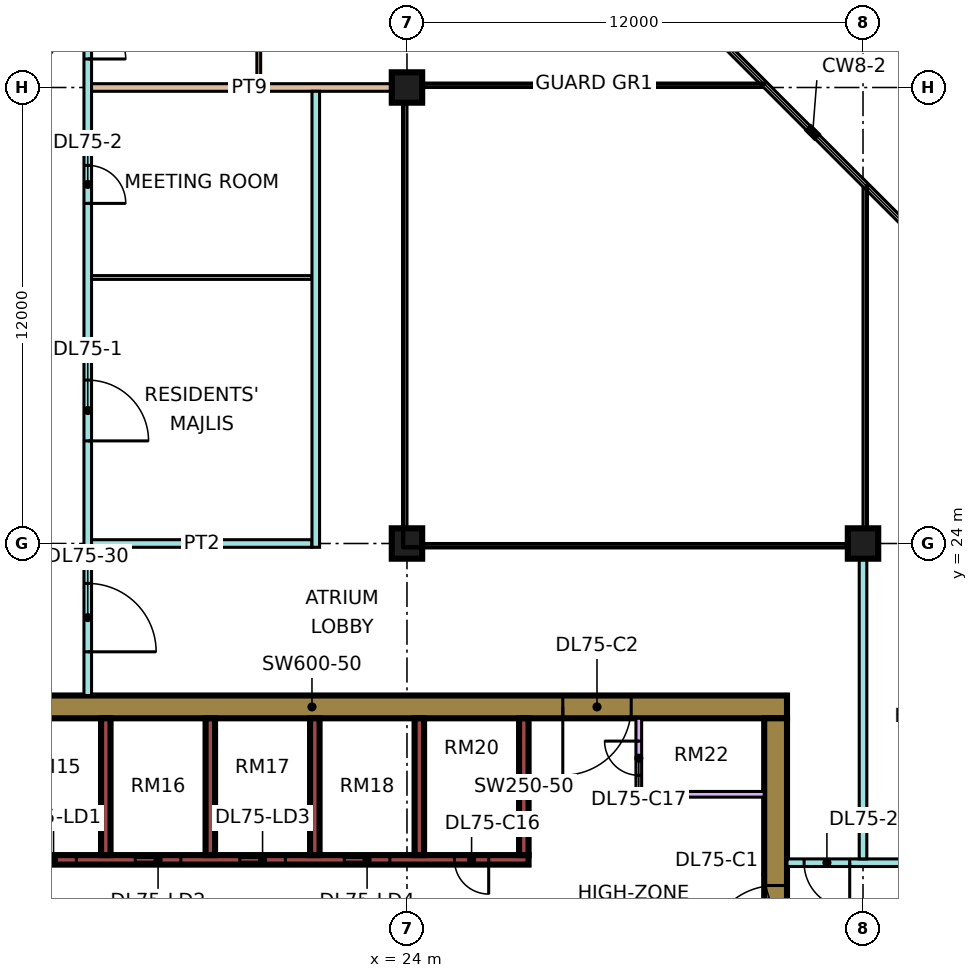
"""IFC4 building model, lengths in metres.
Left out: names, types, materials, properties, quantities, classifications, styles, units other than length and angle.
Written with IfcOpenShell. Run it as: python <this file> out.ifc"""

import sys

from ifc_helpers import new_model, si_unit, direction, frame, frame_2d, origin, origin_2d, place, context, subcontext, project, spatial, rectangle, extrude, element, fill, save


model = new_model("IFC4")
c1 = context("Model", 3, precision=1e-05, world=origin(), true_north=direction((0.0, 1.0)))
c2 = subcontext(c1, "Body", "Model", "MODEL_VIEW")
j1 = project(units=[si_unit("LENGTHUNIT", "METRE"), si_unit("PLANEANGLEUNIT", "RADIAN")], contexts=[c1])
p1 = place(None, origin())
s1 = spatial("IfcSite", under=j1, at=p1, CompositionType="ELEMENT")
p2 = place(p1, origin())
s2 = spatial("IfcBuilding", under=s1, at=p2, CompositionType="ELEMENT")
p3 = place(p2, frame((0.0, 0.0, 318.4)))
s3 = spatial("IfcBuildingStorey", under=s2, at=p3, CompositionType="ELEMENT", Elevation=318.4)
for number, where, z_axis, x_axis in (
    (1, (24.0, 24.0, 0.0), (0.0, 0.0, 1.0), (1.0, 0.0, 0.0)),
    (2, (24.0, 36.0, 0.0), (0.0, 0.0, 1.0), (1.0, 0.0, 0.0)),
    (3, (36.0, 24.0, 0.0), (0.0, 0.0, 1.0), (1.0, 0.0, 0.0)),
):
    element("IfcColumn", number, at=place(p3, frame(where, z_axis=z_axis, x_axis=x_axis)), inside=s3, PredefinedType="COLUMN", context=c2, shape_type="SweptSolid", body=[
        extrude(rectangle(XDim=0.8, YDim=0.8, at=origin_2d()), origin(), (0.0, 0.0, 1.0), 3.75),
    ])
p4 = place(p3, frame((9.0, 19.7, 0.0), z_axis=(0.0, 0.0, 1.0), x_axis=(1.0, 0.0, 0.0)))
e4 = element("IfcWall", 4, at=p4, inside=s3, PredefinedType="SHEAR", context=c2, shape_type="SweptSolid", body=[
    extrude(rectangle(XDim=25.0, YDim=0.6, at=frame_2d((12.5, 0.0))), origin(), (0.0, 0.0, 1.0), 3.75),
])
p5 = place(p4, frame((19.1, 0.0, 0.0)))
e5 = element("IfcOpeningElement", 5, at=p5, cuts=e4, PredefinedType="OPENING", context=c2, shape_type="SweptSolid", body=[
    extrude(rectangle(XDim=1.8, YDim=2.4, at=frame_2d((0.9, 1.2))), frame((0.0, 0.31, 0.0), z_axis=(0.0, -1.0, 0.0), x_axis=(1.0, 0.0, 0.0)), (0.0, 0.0, 1.0), 0.62),
])
p6 = place(p3, frame((33.7, 7.6, 0.0), z_axis=(0.0, 0.0, 1.0), x_axis=(0.0, 1.0, 0.0)))
e6 = element("IfcWall", 6, at=p6, inside=s3, PredefinedType="SHEAR", context=c2, shape_type="SweptSolid", body=[
    extrude(rectangle(XDim=11.8, YDim=0.6, at=frame_2d((5.9, 0.0))), origin(), (0.0, 0.0, 1.0), 3.75),
])
p7 = place(p6, frame((5.6, 0.0, 0.0)))
e7 = element("IfcOpeningElement", 7, at=p7, cuts=e6, PredefinedType="OPENING", context=c2, shape_type="SweptSolid", body=[
    extrude(rectangle(XDim=1.8, YDim=2.4, at=frame_2d((0.9, 1.2))), frame((0.0, 0.31, 0.0), z_axis=(0.0, -1.0, 0.0), x_axis=(1.0, 0.0, 0.0)), (0.0, 0.0, 1.0), 0.62),
])
p8 = place(p3, frame((13.45, 15.675, 0.0), z_axis=(0.0, 0.0, 1.0), x_axis=(1.0, 0.0, 0.0)))
e8 = element("IfcWall", 8, at=p8, inside=s3, PredefinedType="SHEAR", context=c2, shape_type="SweptSolid", body=[
    extrude(rectangle(XDim=13.75, YDim=0.25, at=frame_2d((6.875, 0.0))), origin(), (0.0, 0.0, 1.0), 3.75),
])
p9 = place(p8, frame((0.65, 0.0, 0.0)))
e9 = element("IfcOpeningElement", 9, at=p9, cuts=e8, PredefinedType="OPENING", context=c2, shape_type="SweptSolid", body=[
    extrude(rectangle(XDim=1.2, YDim=2.2, at=frame_2d((0.6, 1.1))), frame((0.0, 0.135, 0.0), z_axis=(0.0, -1.0, 0.0), x_axis=(1.0, 0.0, 0.0)), (0.0, 0.0, 1.0), 0.27),
])
p10 = place(p8, frame((3.4, 0.0, 0.0)))
e10 = element("IfcOpeningElement", 10, at=p10, cuts=e8, PredefinedType="OPENING", context=c2, shape_type="SweptSolid", body=[
    extrude(rectangle(XDim=1.2, YDim=2.2, at=frame_2d((0.6, 1.1))), frame((0.0, 0.135, 0.0), z_axis=(0.0, -1.0, 0.0), x_axis=(1.0, 0.0, 0.0)), (0.0, 0.0, 1.0), 0.27),
])
p11 = place(p8, frame((6.15, 0.0, 0.0)))
e11 = element("IfcOpeningElement", 11, at=p11, cuts=e8, PredefinedType="OPENING", context=c2, shape_type="SweptSolid", body=[
    extrude(rectangle(XDim=1.2, YDim=2.2, at=frame_2d((0.6, 1.1))), frame((0.0, 0.135, 0.0), z_axis=(0.0, -1.0, 0.0), x_axis=(1.0, 0.0, 0.0)), (0.0, 0.0, 1.0), 0.27),
])
p12 = place(p8, frame((8.9, 0.0, 0.0)))
e12 = element("IfcOpeningElement", 12, at=p12, cuts=e8, PredefinedType="OPENING", context=c2, shape_type="SweptSolid", body=[
    extrude(rectangle(XDim=1.2, YDim=2.2, at=frame_2d((0.6, 1.1))), frame((0.0, 0.135, 0.0), z_axis=(0.0, -1.0, 0.0), x_axis=(1.0, 0.0, 0.0)), (0.0, 0.0, 1.0), 0.27),
])
p13 = place(p8, frame((11.8, 0.0, 0.0)))
e13 = element("IfcOpeningElement", 13, at=p13, cuts=e8, PredefinedType="OPENING", context=c2, shape_type="SweptSolid", body=[
    extrude(rectangle(XDim=0.9, YDim=2.1, at=frame_2d((0.45, 1.05))), frame((0.0, 0.135, 0.0), z_axis=(0.0, -1.0, 0.0), x_axis=(1.0, 0.0, 0.0)), (0.0, 0.0, 1.0), 0.27),
])
for number, where, z_axis, x_axis in (
    (14, (16.075, 15.8, 0.0), (0.0, 0.0, 1.0), (0.0, 1.0, 0.0)),
    (15, (18.825, 15.8, 0.0), (0.0, 0.0, 1.0), (0.0, 1.0, 0.0)),
    (16, (21.575, 15.8, 0.0), (0.0, 0.0, 1.0), (0.0, 1.0, 0.0)),
    (17, (24.325, 15.8, 0.0), (0.0, 0.0, 1.0), (0.0, 1.0, 0.0)),
    (18, (27.075, 15.8, 0.0), (0.0, 0.0, 1.0), (0.0, 1.0, 0.0)),
):
    element("IfcWall", number, at=place(p3, frame(where, z_axis=z_axis, x_axis=x_axis)), inside=s3, PredefinedType="SHEAR", context=c2, shape_type="SweptSolid", body=[
        extrude(rectangle(XDim=3.6, YDim=0.25, at=frame_2d((1.8, 0.0))), origin(), (0.0, 0.0, 1.0), 3.75),
    ])
p14 = place(p3, frame((30.1, 17.4, 0.0), z_axis=(0.0, 0.0, 1.0), x_axis=(0.0, 1.0, 0.0)))
e19 = element("IfcWall", 19, at=p14, inside=s3, PredefinedType="PARTITIONING", context=c2, shape_type="SweptSolid", body=[
    extrude(rectangle(XDim=2.0, YDim=0.15, at=frame_2d((1.0, 0.0))), origin(), (0.0, 0.0, 1.0), 3.3),
])
p15 = place(p14, frame((0.5, 0.0, 0.0)))
e20 = element("IfcOpeningElement", 20, at=p15, cuts=e19, PredefinedType="OPENING", context=c2, shape_type="SweptSolid", body=[
    extrude(rectangle(XDim=0.9, YDim=2.1, at=frame_2d((0.45, 1.05))), frame((0.0, 0.085, 0.0), z_axis=(0.0, -1.0, 0.0), x_axis=(1.0, 0.0, 0.0)), (0.0, 0.0, 1.0), 0.17),
])
p16 = place(p3, frame((30.1, 17.4, 0.0), z_axis=(0.0, 0.0, 1.0), x_axis=(1.0, 0.0, 0.0)))
e21 = element("IfcWall", 21, at=p16, inside=s3, PredefinedType="PARTITIONING", context=c2, shape_type="SweptSolid", body=[
    extrude(rectangle(XDim=3.3, YDim=0.15, at=frame_2d((1.65, 0.0))), origin(), (0.0, 0.0, 1.0), 3.3),
])
p17 = place(p3, frame((15.6, 20.0, 0.0), z_axis=(0.0, 0.0, 1.0), x_axis=(0.0, 1.0, 0.0)))
e22 = element("IfcWall", 22, at=p17, inside=s3, PredefinedType="PARTITIONING", context=c2, shape_type="SweptSolid", body=[
    extrude(rectangle(XDim=27.775, YDim=0.2, at=frame_2d((13.887, 0.0))), origin(), (0.0, 0.0, 1.0), 3.3),
])
p18 = place(p17, frame((6.7, 0.0, 0.0)))
e23 = element("IfcOpeningElement", 23, at=p18, cuts=e22, PredefinedType="OPENING", context=c2, shape_type="SweptSolid", body=[
    extrude(rectangle(XDim=1.6, YDim=2.1, at=frame_2d((0.8, 1.05))), frame((0.0, 0.11, 0.0), z_axis=(0.0, -1.0, 0.0), x_axis=(1.0, 0.0, 0.0)), (0.0, 0.0, 1.0), 0.22),
])
p19 = place(p17, frame((12.95, 0.0, 0.0)))
e24 = element("IfcOpeningElement", 24, at=p19, cuts=e22, PredefinedType="OPENING", context=c2, shape_type="SweptSolid", body=[
    extrude(rectangle(XDim=1.0, YDim=2.1, at=frame_2d((0.5, 1.05))), frame((0.0, 0.11, 0.0), z_axis=(0.0, -1.0, 0.0), x_axis=(1.0, 0.0, 0.0)), (0.0, 0.0, 1.0), 0.22),
])
p20 = place(p17, frame((16.75, 0.0, 0.0)))
e25 = element("IfcOpeningElement", 25, at=p20, cuts=e22, PredefinedType="OPENING", context=c2, shape_type="SweptSolid", body=[
    extrude(rectangle(XDim=1.0, YDim=2.1, at=frame_2d((0.5, 1.05))), frame((0.0, 0.11, 0.0), z_axis=(0.0, -1.0, 0.0), x_axis=(1.0, 0.0, 0.0)), (0.0, 0.0, 1.0), 0.22),
])
p21 = place(p17, frame((1.15, 0.0, 0.0)))
e26 = element("IfcOpeningElement", 26, at=p21, cuts=e22, PredefinedType="OPENING", context=c2, shape_type="SweptSolid", body=[
    extrude(rectangle(XDim=1.8, YDim=2.1, at=frame_2d((0.9, 1.05))), frame((0.0, 0.11, 0.0), z_axis=(0.0, -1.0, 0.0), x_axis=(1.0, 0.0, 0.0)), (0.0, 0.0, 1.0), 0.22),
])
p22 = place(p17, frame((25.9, 0.0, 0.0)))
e27 = element("IfcOpeningElement", 27, at=p22, cuts=e22, PredefinedType="OPENING", context=c2, shape_type="SweptSolid", body=[
    extrude(rectangle(XDim=1.0, YDim=2.1, at=frame_2d((0.5, 1.05))), frame((0.0, 0.11, 0.0), z_axis=(0.0, -1.0, 0.0), x_axis=(1.0, 0.0, 0.0)), (0.0, 0.0, 1.0), 0.22),
])
p23 = place(p3, frame((15.7, 24.0, 0.0), z_axis=(0.0, 0.0, 1.0), x_axis=(1.0, 0.0, 0.0)))
e28 = element("IfcWall", 28, at=p23, inside=s3, PredefinedType="PARTITIONING", context=c2, shape_type="SweptSolid", body=[
    extrude(rectangle(XDim=5.8, YDim=0.2, at=frame_2d((2.9, 0.0))), origin(), (0.0, 0.0, 1.0), 3.3),
])
p24 = place(p3, frame((15.7, 31.0, 0.0), z_axis=(0.0, 0.0, 1.0), x_axis=(1.0, 0.0, 0.0)))
e29 = element("IfcWall", 29, at=p24, inside=s3, PredefinedType="PARTITIONING", context=c2, shape_type="SweptSolid", body=[
    extrude(rectangle(XDim=5.8, YDim=0.1, at=frame_2d((2.9, 0.0))), origin(), (0.0, 0.0, 1.0), 3.3),
])
p25 = place(p3, frame((15.7, 36.0, 0.0), z_axis=(0.0, 0.0, 1.0), x_axis=(1.0, 0.0, 0.0)))
e30 = element("IfcWall", 30, at=p25, inside=s3, PredefinedType="PARTITIONING", context=c2, shape_type="SweptSolid", body=[
    extrude(rectangle(XDim=8.3, YDim=0.2, at=frame_2d((4.15, 0.0))), origin(), (0.0, 0.0, 1.0), 3.3),
])
p26 = place(p3, frame((20.1, 36.1, 0.0), z_axis=(0.0, 0.0, 1.0), x_axis=(0.0, 1.0, 0.0)))
e31 = element("IfcWall", 31, at=p26, inside=s3, PredefinedType="PARTITIONING", context=c2, shape_type="SweptSolid", body=[
    extrude(rectangle(XDim=5.95, YDim=0.1, at=frame_2d((2.975, 0.0))), origin(), (0.0, 0.0, 1.0), 3.3),
])
p27 = place(p26, frame((0.95, 0.0, 0.0)))
e32 = element("IfcOpeningElement", 32, at=p27, cuts=e31, PredefinedType="OPENING", context=c2, shape_type="SweptSolid", body=[
    extrude(rectangle(XDim=0.9, YDim=2.1, at=frame_2d((0.45, 1.05))), frame((0.0, 0.06, 0.0), z_axis=(0.0, -1.0, 0.0), x_axis=(1.0, 0.0, 0.0)), (0.0, 0.0, 1.0), 0.12),
])
p28 = place(p26, frame((3.95, 0.0, 0.0)))
e33 = element("IfcOpeningElement", 33, at=p28, cuts=e31, PredefinedType="OPENING", context=c2, shape_type="SweptSolid", body=[
    extrude(rectangle(XDim=0.9, YDim=2.1, at=frame_2d((0.45, 1.05))), frame((0.0, 0.06, 0.0), z_axis=(0.0, -1.0, 0.0), x_axis=(1.0, 0.0, 0.0)), (0.0, 0.0, 1.0), 0.12),
])
p29 = place(p3, frame((21.6, 23.9, 0.0), z_axis=(0.0, 0.0, 1.0), x_axis=(0.0, 1.0, 0.0)))
e34 = element("IfcWall", 34, at=p29, inside=s3, PredefinedType="PARTITIONING", context=c2, shape_type="SweptSolid", body=[
    extrude(rectangle(XDim=12.0, YDim=0.2, at=frame_2d((6.0, 0.0))), origin(), (0.0, 0.0, 1.0), 3.3),
])
p30 = place(p3, frame((34.0, 15.6, 0.0), z_axis=(0.0, 0.0, 1.0), x_axis=(1.0, 0.0, 0.0)))
e35 = element("IfcWall", 35, at=p30, inside=s3, PredefinedType="PARTITIONING", context=c2, shape_type="SweptSolid", body=[
    extrude(rectangle(XDim=10.35, YDim=0.2, at=frame_2d((5.175, 0.0))), origin(), (0.0, 0.0, 1.0), 3.3),
])
p31 = place(p30, frame((5.6, 0.0, 0.0)))
e36 = element("IfcOpeningElement", 36, at=p31, cuts=e35, PredefinedType="OPENING", context=c2, shape_type="SweptSolid", body=[
    extrude(rectangle(XDim=1.0, YDim=2.1, at=frame_2d((0.5, 1.05))), frame((0.0, 0.11, 0.0), z_axis=(0.0, -1.0, 0.0), x_axis=(1.0, 0.0, 0.0)), (0.0, 0.0, 1.0), 0.22),
])
p32 = place(p30, frame((0.45, 0.0, 0.0)))
e37 = element("IfcOpeningElement", 37, at=p32, cuts=e35, PredefinedType="OPENING", context=c2, shape_type="SweptSolid", body=[
    extrude(rectangle(XDim=1.2, YDim=2.1, at=frame_2d((0.6, 1.05))), frame((0.0, 0.11, 0.0), z_axis=(0.0, -1.0, 0.0), x_axis=(1.0, 0.0, 0.0)), (0.0, 0.0, 1.0), 0.22),
])
p33 = place(p3, frame((36.0, 15.7, 0.0), z_axis=(0.0, 0.0, 1.0), x_axis=(0.0, 1.0, 0.0)))
e38 = element("IfcWall", 38, at=p33, inside=s3, PredefinedType="PARTITIONING", context=c2, shape_type="SweptSolid", body=[
    extrude(rectangle(XDim=8.3, YDim=0.2, at=frame_2d((4.15, 0.0))), origin(), (0.0, 0.0, 1.0), 3.3),
])
p34 = place(p9, origin())
e39 = element("IfcDoor", 39, at=p34, inside=s3, OperationType="DOUBLE_DOOR_SLIDING", PredefinedType="DOOR", context=c2, shape_type="SweptSolid", body=[
    extrude(rectangle(XDim=1.2, YDim=2.2, at=frame_2d((0.6, 1.1))), frame((0.0, 0.025, 0.0), z_axis=(0.0, -1.0, 0.0), x_axis=(1.0, 0.0, 0.0)), (0.0, 0.0, 1.0), 0.05),
])
fill(e9, e39)
p35 = place(p10, origin())
e40 = element("IfcDoor", 40, at=p35, inside=s3, OperationType="DOUBLE_DOOR_SLIDING", PredefinedType="DOOR", context=c2, shape_type="SweptSolid", body=[
    extrude(rectangle(XDim=1.2, YDim=2.2, at=frame_2d((0.6, 1.1))), frame((0.0, 0.025, 0.0), z_axis=(0.0, -1.0, 0.0), x_axis=(1.0, 0.0, 0.0)), (0.0, 0.0, 1.0), 0.05),
])
fill(e10, e40)
p36 = place(p11, origin())
e41 = element("IfcDoor", 41, at=p36, inside=s3, OperationType="DOUBLE_DOOR_SLIDING", PredefinedType="DOOR", context=c2, shape_type="SweptSolid", body=[
    extrude(rectangle(XDim=1.2, YDim=2.2, at=frame_2d((0.6, 1.1))), frame((0.0, 0.025, 0.0), z_axis=(0.0, -1.0, 0.0), x_axis=(1.0, 0.0, 0.0)), (0.0, 0.0, 1.0), 0.05),
])
fill(e11, e41)
p37 = place(p12, origin())
e42 = element("IfcDoor", 42, at=p37, inside=s3, OperationType="DOUBLE_DOOR_SLIDING", PredefinedType="DOOR", context=c2, shape_type="SweptSolid", body=[
    extrude(rectangle(XDim=1.2, YDim=2.2, at=frame_2d((0.6, 1.1))), frame((0.0, 0.025, 0.0), z_axis=(0.0, -1.0, 0.0), x_axis=(1.0, 0.0, 0.0)), (0.0, 0.0, 1.0), 0.05),
])
fill(e12, e42)
p38 = place(p7, origin())
e43 = element("IfcDoor", 43, at=p38, inside=s3, OperationType="DOUBLE_DOOR_SINGLE_SWING", PredefinedType="DOOR", context=c2, shape_type="SweptSolid", body=[
    extrude(rectangle(XDim=1.8, YDim=2.4, at=frame_2d((0.9, 1.2))), frame((0.0, 0.025, 0.0), z_axis=(0.0, -1.0, 0.0), x_axis=(1.0, 0.0, 0.0)), (0.0, 0.0, 1.0), 0.05),
])
fill(e7, e43)
p39 = place(p5, frame((1.8, 0.0, 0.0), z_axis=(0.0, 0.0, 1.0), x_axis=(-1.0, 0.0, 0.0)))
e44 = element("IfcDoor", 44, at=p39, inside=s3, OperationType="DOUBLE_DOOR_SINGLE_SWING", PredefinedType="DOOR", context=c2, shape_type="SweptSolid", body=[
    extrude(rectangle(XDim=1.8, YDim=2.4, at=frame_2d((0.9, 1.2))), frame((0.0, 0.025, 0.0), z_axis=(0.0, -1.0, 0.0), x_axis=(1.0, 0.0, 0.0)), (0.0, 0.0, 1.0), 0.05),
])
fill(e5, e44)
p40 = place(p13, origin())
e45 = element("IfcDoor", 45, at=p40, inside=s3, OperationType="SINGLE_SWING_RIGHT", PredefinedType="DOOR", context=c2, shape_type="SweptSolid", body=[
    extrude(rectangle(XDim=0.9, YDim=2.1, at=frame_2d((0.45, 1.05))), frame((0.0, 0.025, 0.0), z_axis=(0.0, -1.0, 0.0), x_axis=(1.0, 0.0, 0.0)), (0.0, 0.0, 1.0), 0.05),
])
fill(e13, e45)
p41 = place(p15, frame((0.9, 0.0, 0.0), z_axis=(0.0, 0.0, 1.0), x_axis=(-1.0, 0.0, 0.0)))
e46 = element("IfcDoor", 46, at=p41, inside=s3, OperationType="SINGLE_SWING_RIGHT", PredefinedType="DOOR", context=c2, shape_type="SweptSolid", body=[
    extrude(rectangle(XDim=0.9, YDim=2.1, at=frame_2d((0.45, 1.05))), frame((0.0, 0.025, 0.0), z_axis=(0.0, -1.0, 0.0), x_axis=(1.0, 0.0, 0.0)), (0.0, 0.0, 1.0), 0.05),
])
fill(e20, e46)
p42 = place(p18, frame((1.6, 0.0, 0.0), z_axis=(0.0, 0.0, 1.0), x_axis=(-1.0, 0.0, 0.0)))
e47 = element("IfcDoor", 47, at=p42, inside=s3, OperationType="DOUBLE_DOOR_SINGLE_SWING", PredefinedType="DOOR", context=c2, shape_type="SweptSolid", body=[
    extrude(rectangle(XDim=1.6, YDim=2.1, at=frame_2d((0.8, 1.05))), frame((0.0, 0.025, 0.0), z_axis=(0.0, -1.0, 0.0), x_axis=(1.0, 0.0, 0.0)), (0.0, 0.0, 1.0), 0.05),
])
fill(e23, e47)
p43 = place(p19, frame((1.0, 0.0, 0.0), z_axis=(0.0, 0.0, 1.0), x_axis=(-1.0, 0.0, 0.0)))
e48 = element("IfcDoor", 48, at=p43, inside=s3, OperationType="SINGLE_SWING_LEFT", PredefinedType="DOOR", context=c2, shape_type="SweptSolid", body=[
    extrude(rectangle(XDim=1.0, YDim=2.1, at=frame_2d((0.5, 1.05))), frame((0.0, 0.025, 0.0), z_axis=(0.0, -1.0, 0.0), x_axis=(1.0, 0.0, 0.0)), (0.0, 0.0, 1.0), 0.05),
])
fill(e24, e48)
p44 = place(p20, frame((1.0, 0.0, 0.0), z_axis=(0.0, 0.0, 1.0), x_axis=(-1.0, 0.0, 0.0)))
e49 = element("IfcDoor", 49, at=p44, inside=s3, OperationType="SINGLE_SWING_LEFT", PredefinedType="DOOR", context=c2, shape_type="SweptSolid", body=[
    extrude(rectangle(XDim=1.0, YDim=2.1, at=frame_2d((0.5, 1.05))), frame((0.0, 0.025, 0.0), z_axis=(0.0, -1.0, 0.0), x_axis=(1.0, 0.0, 0.0)), (0.0, 0.0, 1.0), 0.05),
])
fill(e25, e49)
p45 = place(p32, origin())
e50 = element("IfcDoor", 50, at=p45, inside=s3, OperationType="SINGLE_SWING_RIGHT", PredefinedType="DOOR", context=c2, shape_type="SweptSolid", body=[
    extrude(rectangle(XDim=1.2, YDim=2.1, at=frame_2d((0.6, 1.05))), frame((0.0, 0.025, 0.0), z_axis=(0.0, -1.0, 0.0), x_axis=(1.0, 0.0, 0.0)), (0.0, 0.0, 1.0), 0.05),
])
fill(e37, e50)
p46 = place(p21, frame((1.8, 0.0, 0.0), z_axis=(0.0, 0.0, 1.0), x_axis=(-1.0, 0.0, 0.0)))
e51 = element("IfcDoor", 51, at=p46, inside=s3, OperationType="DOUBLE_DOOR_SINGLE_SWING", PredefinedType="DOOR", context=c2, shape_type="SweptSolid", body=[
    extrude(rectangle(XDim=1.8, YDim=2.1, at=frame_2d((0.9, 1.05))), frame((0.0, 0.025, 0.0), z_axis=(0.0, -1.0, 0.0), x_axis=(1.0, 0.0, 0.0)), (0.0, 0.0, 1.0), 0.05),
])
fill(e26, e51)
save(model, sys.argv[1])
